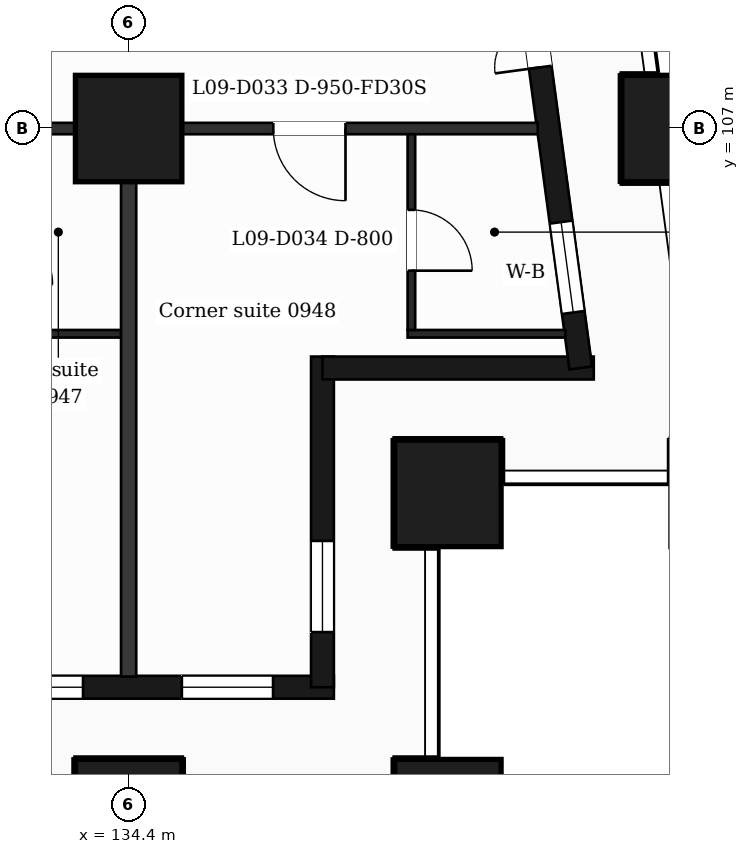
"""IFC4 building model, lengths in metres.
Left out: names, types, materials, properties, quantities, classifications, styles, units other than length and angle.
Written with IfcOpenShell. Run it as: python <this file> out.ifc"""

import sys

from ifc_helpers import new_model, si_unit, direction, frame, frame_2d, origin, origin_2d, place, context, subcontext, project, spatial, rectangle, extrude, element, fill, save


model = new_model("IFC4")
c1 = context("Model", 3, precision=1e-05, world=origin(), true_north=direction((0.0, 1.0)))
c2 = subcontext(c1, "Body", "Model", "MODEL_VIEW")
j1 = project(units=[si_unit("LENGTHUNIT", "METRE"), si_unit("PLANEANGLEUNIT", "RADIAN")], contexts=[c1])
p1 = place(None, origin())
s1 = spatial("IfcSite", under=j1, at=p1, CompositionType="ELEMENT")
p2 = place(p1, origin())
s2 = spatial("IfcBuilding", under=s1, at=p2, CompositionType="ELEMENT")
p3 = place(p2, frame((0.0, 0.0, 49.5)))
s3 = spatial("IfcBuildingStorey", under=s2, at=p3, CompositionType="ELEMENT", Elevation=49.5)
for number, where, z_axis, x_axis in (
    (1, (134.4, 98.0, 0.0), (0.0, 0.0, 1.0), (1.0, 0.0, 0.0)),
    (2, (138.6, 98.0, 0.0), (0.0, 0.0, 1.0), (1.0, 0.0, 0.0)),
    (3, (138.6, 102.2, 0.0), (0.0, 0.0, 1.0), (1.0, 0.0, 0.0)),
    (4, (134.4, 107.0, 0.0), (0.0, 0.0, 1.0), (1.0, 0.0, 0.0)),
    (5, (141.588, 107.0, 0.0), (0.0, 0.0, 1.0), (1.0, 0.0, 0.0)),
):
    element("IfcColumn", number, at=place(p3, frame(where, z_axis=z_axis, x_axis=x_axis)), inside=s3, PredefinedType="COLUMN", context=c2, shape_type="SweptSolid", body=[
        extrude(rectangle(XDim=1.4, YDim=1.4, at=origin_2d()), origin(), (0.0, 0.0, 1.0), 3.5),
    ])
p4 = place(p3, frame((89.85, 99.65, 0.0), z_axis=(0.0, 0.0, 1.0), x_axis=(1.0, 0.0, 0.0)))
e6 = element("IfcWall", 6, at=p4, inside=s3, PredefinedType="SOLIDWALL", context=c2, shape_type="SweptSolid", body=[
    extrude(rectangle(XDim=47.25, YDim=0.3, at=frame_2d((23.625, 0.0))), origin(), (0.0, 0.0, 1.0), 3.18),
])
p5 = place(p4, frame((0.725, 0.0, 0.9)))
e7 = element("IfcOpeningElement", 7, at=p5, cuts=e6, PredefinedType="OPENING", context=c2, shape_type="SweptSolid", body=[
    extrude(rectangle(XDim=1.2, YDim=2.1, at=frame_2d((0.6, 1.05))), frame((0.0, 0.16, 0.0), z_axis=(0.0, -1.0, 0.0), x_axis=(1.0, 0.0, 0.0)), (0.0, 0.0, 1.0), 0.32),
])
p6 = place(p4, frame((3.45, 0.0, 0.9)))
e8 = element("IfcOpeningElement", 8, at=p6, cuts=e6, PredefinedType="OPENING", context=c2, shape_type="SweptSolid", body=[
    extrude(rectangle(XDim=2.4, YDim=2.1, at=frame_2d((1.2, 1.05))), frame((0.0, 0.16, 0.0), z_axis=(0.0, -1.0, 0.0), x_axis=(1.0, 0.0, 0.0)), (0.0, 0.0, 1.0), 0.32),
])
p7 = place(p4, frame((7.65, 0.0, 0.9)))
e9 = element("IfcOpeningElement", 9, at=p7, cuts=e6, PredefinedType="OPENING", context=c2, shape_type="SweptSolid", body=[
    extrude(rectangle(XDim=2.4, YDim=2.1, at=frame_2d((1.2, 1.05))), frame((0.0, 0.16, 0.0), z_axis=(0.0, -1.0, 0.0), x_axis=(1.0, 0.0, 0.0)), (0.0, 0.0, 1.0), 0.32),
])
p8 = place(p4, frame((11.85, 0.0, 0.9)))
e10 = element("IfcOpeningElement", 10, at=p8, cuts=e6, PredefinedType="OPENING", context=c2, shape_type="SweptSolid", body=[
    extrude(rectangle(XDim=2.4, YDim=2.1, at=frame_2d((1.2, 1.05))), frame((0.0, 0.16, 0.0), z_axis=(0.0, -1.0, 0.0), x_axis=(1.0, 0.0, 0.0)), (0.0, 0.0, 1.0), 0.32),
])
p9 = place(p4, frame((16.05, 0.0, 0.9)))
e11 = element("IfcOpeningElement", 11, at=p9, cuts=e6, PredefinedType="OPENING", context=c2, shape_type="SweptSolid", body=[
    extrude(rectangle(XDim=2.4, YDim=2.1, at=frame_2d((1.2, 1.05))), frame((0.0, 0.16, 0.0), z_axis=(0.0, -1.0, 0.0), x_axis=(1.0, 0.0, 0.0)), (0.0, 0.0, 1.0), 0.32),
])
p10 = place(p4, frame((20.25, 0.0, 0.9)))
e12 = element("IfcOpeningElement", 12, at=p10, cuts=e6, PredefinedType="OPENING", context=c2, shape_type="SweptSolid", body=[
    extrude(rectangle(XDim=2.4, YDim=2.1, at=frame_2d((1.2, 1.05))), frame((0.0, 0.16, 0.0), z_axis=(0.0, -1.0, 0.0), x_axis=(1.0, 0.0, 0.0)), (0.0, 0.0, 1.0), 0.32),
])
p11 = place(p4, frame((25.05, 0.0, 0.9)))
e13 = element("IfcOpeningElement", 13, at=p11, cuts=e6, PredefinedType="OPENING", context=c2, shape_type="SweptSolid", body=[
    extrude(rectangle(XDim=1.2, YDim=2.1, at=frame_2d((0.6, 1.05))), frame((0.0, 0.16, 0.0), z_axis=(0.0, -1.0, 0.0), x_axis=(1.0, 0.0, 0.0)), (0.0, 0.0, 1.0), 0.32),
])
p12 = place(p4, frame((29.25, 0.0, 0.9)))
e14 = element("IfcOpeningElement", 14, at=p12, cuts=e6, PredefinedType="OPENING", context=c2, shape_type="SweptSolid", body=[
    extrude(rectangle(XDim=1.2, YDim=2.1, at=frame_2d((0.6, 1.05))), frame((0.0, 0.16, 0.0), z_axis=(0.0, -1.0, 0.0), x_axis=(1.0, 0.0, 0.0)), (0.0, 0.0, 1.0), 0.32),
])
p13 = place(p4, frame((32.55, 0.0, 0.0)))
e15 = element("IfcOpeningElement", 15, at=p13, cuts=e6, PredefinedType="OPENING", context=c2, shape_type="SweptSolid", body=[
    extrude(rectangle(XDim=1.2, YDim=2.4, at=frame_2d((0.6, 1.2))), frame((0.0, 0.16, 0.0), z_axis=(0.0, -1.0, 0.0), x_axis=(1.0, 0.0, 0.0)), (0.0, 0.0, 1.0), 0.32),
])
p14 = place(p4, frame((34.35, 0.0, 0.9)))
e16 = element("IfcOpeningElement", 16, at=p14, cuts=e6, PredefinedType="OPENING", context=c2, shape_type="SweptSolid", body=[
    extrude(rectangle(XDim=1.2, YDim=2.1, at=frame_2d((0.6, 1.05))), frame((0.0, 0.16, 0.0), z_axis=(0.0, -1.0, 0.0), x_axis=(1.0, 0.0, 0.0)), (0.0, 0.0, 1.0), 0.32),
])
p15 = place(p4, frame((37.05, 0.0, 0.9)))
e17 = element("IfcOpeningElement", 17, at=p15, cuts=e6, PredefinedType="OPENING", context=c2, shape_type="SweptSolid", body=[
    extrude(rectangle(XDim=2.4, YDim=2.1, at=frame_2d((1.2, 1.05))), frame((0.0, 0.16, 0.0), z_axis=(0.0, -1.0, 0.0), x_axis=(1.0, 0.0, 0.0)), (0.0, 0.0, 1.0), 0.32),
])
p16 = place(p4, frame((40.95, 0.0, 0.0)))
e18 = element("IfcOpeningElement", 18, at=p16, cuts=e6, PredefinedType="OPENING", context=c2, shape_type="SweptSolid", body=[
    extrude(rectangle(XDim=1.2, YDim=2.4, at=frame_2d((0.6, 1.2))), frame((0.0, 0.16, 0.0), z_axis=(0.0, -1.0, 0.0), x_axis=(1.0, 0.0, 0.0)), (0.0, 0.0, 1.0), 0.32),
])
p17 = place(p4, frame((42.75, 0.0, 0.9)))
e19 = element("IfcOpeningElement", 19, at=p17, cuts=e6, PredefinedType="OPENING", context=c2, shape_type="SweptSolid", body=[
    extrude(rectangle(XDim=1.2, YDim=2.1, at=frame_2d((0.6, 1.05))), frame((0.0, 0.16, 0.0), z_axis=(0.0, -1.0, 0.0), x_axis=(1.0, 0.0, 0.0)), (0.0, 0.0, 1.0), 0.32),
])
p18 = place(p4, frame((45.25, 0.0, 0.9)))
e20 = element("IfcOpeningElement", 20, at=p18, cuts=e6, PredefinedType="OPENING", context=c2, shape_type="SweptSolid", body=[
    extrude(rectangle(XDim=1.2, YDim=2.1, at=frame_2d((0.6, 1.05))), frame((0.0, 0.16, 0.0), z_axis=(0.0, -1.0, 0.0), x_axis=(1.0, 0.0, 0.0)), (0.0, 0.0, 1.0), 0.32),
])
p19 = place(p3, frame((136.95, 99.65, 0.0), z_axis=(0.0, 0.0, 1.0), x_axis=(0.0, 1.0, 0.0)))
e21 = element("IfcWall", 21, at=p19, inside=s3, PredefinedType="SOLIDWALL", context=c2, shape_type="SweptSolid", body=[
    extrude(rectangle(XDim=4.35, YDim=0.3, at=frame_2d((2.175, 0.0))), origin(), (0.0, 0.0, 1.0), 3.18),
])
p20 = place(p19, frame((0.725, 0.0, 0.9)))
e22 = element("IfcOpeningElement", 22, at=p20, cuts=e21, PredefinedType="OPENING", context=c2, shape_type="SweptSolid", body=[
    extrude(rectangle(XDim=1.2, YDim=2.1, at=frame_2d((0.6, 1.05))), frame((0.0, 0.16, 0.0), z_axis=(0.0, -1.0, 0.0), x_axis=(1.0, 0.0, 0.0)), (0.0, 0.0, 1.0), 0.32),
])
p21 = place(p3, frame((136.95, 103.85, 0.0), z_axis=(0.0, 0.0, 1.0), x_axis=(1.0, 0.0, 0.0)))
e23 = element("IfcWall", 23, at=p21, inside=s3, PredefinedType="SOLIDWALL", context=c2, shape_type="SweptSolid", body=[
    extrude(rectangle(XDim=3.569, YDim=0.3, at=frame_2d((1.785, 0.0))), origin(), (0.0, 0.0, 1.0), 3.18),
])
p22 = place(p3, frame((140.348, 103.85, 0.0), z_axis=(0.0, 0.0, 1.0), x_axis=(-0.133431549479, 0.991058031401, 0.0)))
e24 = element("IfcWall", 24, at=p22, inside=s3, PredefinedType="SOLIDWALL", context=c2, shape_type="SweptSolid", body=[
    extrude(rectangle(XDim=6.609, YDim=0.3, at=frame_2d((3.304, 0.0))), origin(), (0.0, 0.0, 1.0), 3.18),
])
p23 = place(p22, frame((0.737, 0.0, 0.9)))
e25 = element("IfcOpeningElement", 25, at=p23, cuts=e24, PredefinedType="OPENING", context=c2, shape_type="SweptSolid", body=[
    extrude(rectangle(XDim=1.2, YDim=2.1, at=frame_2d((0.6, 1.05))), frame((0.0, 0.16, 0.0), z_axis=(0.0, -1.0, 0.0), x_axis=(1.0, 0.0, 0.0)), (0.0, 0.0, 1.0), 0.32),
])
p24 = place(p22, frame((3.991, 0.0, 0.0)))
e26 = element("IfcOpeningElement", 26, at=p24, cuts=e24, PredefinedType="OPENING", context=c2, shape_type="SweptSolid", body=[
    extrude(rectangle(XDim=1.2, YDim=2.4, at=frame_2d((0.6, 1.2))), frame((0.0, 0.16, 0.0), z_axis=(0.0, -1.0, 0.0), x_axis=(1.0, 0.0, 0.0)), (0.0, 0.0, 1.0), 0.32),
])
p25 = place(p3, frame((132.55, 104.3, 0.0), z_axis=(0.0, 0.0, 1.0), x_axis=(1.0, 0.0, 0.0)))
e27 = element("IfcWall", 27, at=p25, inside=s3, PredefinedType="PARTITIONING", context=c2, shape_type="SweptSolid", body=[
    extrude(rectangle(XDim=1.85, YDim=0.1, at=frame_2d((0.925, 0.0))), origin(), (0.0, 0.0, 1.0), 3.18),
])
p26 = place(p3, frame((138.07, 104.3, 0.0), z_axis=(0.0, 0.0, 1.0), x_axis=(1.0, 0.0, 0.0)))
e28 = element("IfcWall", 28, at=p26, inside=s3, PredefinedType="PARTITIONING", context=c2, shape_type="SweptSolid", body=[
    extrude(rectangle(XDim=2.076, YDim=0.1, at=frame_2d((1.038, 0.0))), origin(), (0.0, 0.0, 1.0), 3.18),
])
p27 = place(p3, frame((87.018, 107.0, 0.0), z_axis=(0.0, 0.0, 1.0), x_axis=(1.0, 0.0, 0.0)))
e29 = element("IfcWall", 29, at=p27, inside=s3, PredefinedType="PARTITIONING", context=c2, shape_type="SweptSolid", body=[
    extrude(rectangle(XDim=52.765, YDim=0.15, at=frame_2d((26.382, 0.0))), origin(), (0.0, 0.0, 1.0), 3.18),
])
p28 = place(p27, frame((0.87, 0.0, 0.0)))
e30 = element("IfcOpeningElement", 30, at=p28, cuts=e29, PredefinedType="OPENING", context=c2, shape_type="SweptSolid", body=[
    extrude(rectangle(XDim=0.95, YDim=2.1, at=frame_2d((0.475, 1.05))), frame((0.0, 0.085, 0.0), z_axis=(0.0, -1.0, 0.0), x_axis=(1.0, 0.0, 0.0)), (0.0, 0.0, 1.0), 0.17),
])
p29 = place(p27, frame((6.752, 0.0, 0.0)))
e31 = element("IfcOpeningElement", 31, at=p29, cuts=e29, PredefinedType="OPENING", context=c2, shape_type="SweptSolid", body=[
    extrude(rectangle(XDim=0.95, YDim=2.1, at=frame_2d((0.475, 1.05))), frame((0.0, 0.085, 0.0), z_axis=(0.0, -1.0, 0.0), x_axis=(1.0, 0.0, 0.0)), (0.0, 0.0, 1.0), 0.17),
])
p30 = place(p27, frame((9.857, 0.0, 0.0)))
e32 = element("IfcOpeningElement", 32, at=p30, cuts=e29, PredefinedType="OPENING", context=c2, shape_type="SweptSolid", body=[
    extrude(rectangle(XDim=0.95, YDim=2.1, at=frame_2d((0.475, 1.05))), frame((0.0, 0.085, 0.0), z_axis=(0.0, -1.0, 0.0), x_axis=(1.0, 0.0, 0.0)), (0.0, 0.0, 1.0), 0.17),
])
p31 = place(p27, frame((14.682, 0.0, 0.0)))
e33 = element("IfcOpeningElement", 33, at=p31, cuts=e29, PredefinedType="OPENING", context=c2, shape_type="SweptSolid", body=[
    extrude(rectangle(XDim=0.95, YDim=2.1, at=frame_2d((0.475, 1.05))), frame((0.0, 0.085, 0.0), z_axis=(0.0, -1.0, 0.0), x_axis=(1.0, 0.0, 0.0)), (0.0, 0.0, 1.0), 0.17),
])
p32 = place(p27, frame((19.862, 0.0, 0.0)))
e34 = element("IfcOpeningElement", 34, at=p32, cuts=e29, PredefinedType="OPENING", context=c2, shape_type="SweptSolid", body=[
    extrude(rectangle(XDim=0.95, YDim=2.1, at=frame_2d((0.475, 1.05))), frame((0.0, 0.085, 0.0), z_axis=(0.0, -1.0, 0.0), x_axis=(1.0, 0.0, 0.0)), (0.0, 0.0, 1.0), 0.17),
])
p33 = place(p27, frame((25.157, 0.0, 0.0)))
e35 = element("IfcOpeningElement", 35, at=p33, cuts=e29, PredefinedType="OPENING", context=c2, shape_type="SweptSolid", body=[
    extrude(rectangle(XDim=0.95, YDim=2.1, at=frame_2d((0.475, 1.05))), frame((0.0, 0.085, 0.0), z_axis=(0.0, -1.0, 0.0), x_axis=(1.0, 0.0, 0.0)), (0.0, 0.0, 1.0), 0.17),
])
p34 = place(p27, frame((28.262, 0.0, 0.0)))
e36 = element("IfcOpeningElement", 36, at=p34, cuts=e29, PredefinedType="OPENING", context=c2, shape_type="SweptSolid", body=[
    extrude(rectangle(XDim=0.95, YDim=2.1, at=frame_2d((0.475, 1.05))), frame((0.0, 0.085, 0.0), z_axis=(0.0, -1.0, 0.0), x_axis=(1.0, 0.0, 0.0)), (0.0, 0.0, 1.0), 0.17),
])
p35 = place(p27, frame((32.207, 0.0, 0.0)))
e37 = element("IfcOpeningElement", 37, at=p35, cuts=e29, PredefinedType="OPENING", context=c2, shape_type="SweptSolid", body=[
    extrude(rectangle(XDim=0.95, YDim=2.1, at=frame_2d((0.475, 1.05))), frame((0.0, 0.085, 0.0), z_axis=(0.0, -1.0, 0.0), x_axis=(1.0, 0.0, 0.0)), (0.0, 0.0, 1.0), 0.17),
])
p36 = place(p27, frame((37.094, 0.0, 0.0)))
e38 = element("IfcOpeningElement", 38, at=p36, cuts=e29, PredefinedType="OPENING", context=c2, shape_type="SweptSolid", body=[
    extrude(rectangle(XDim=0.95, YDim=2.1, at=frame_2d((0.475, 1.05))), frame((0.0, 0.085, 0.0), z_axis=(0.0, -1.0, 0.0), x_axis=(1.0, 0.0, 0.0)), (0.0, 0.0, 1.0), 0.17),
])
p37 = place(p27, frame((43.045, 0.0, 0.0)))
e39 = element("IfcOpeningElement", 39, at=p37, cuts=e29, PredefinedType="OPENING", context=c2, shape_type="SweptSolid", body=[
    extrude(rectangle(XDim=0.95, YDim=2.1, at=frame_2d((0.475, 1.05))), frame((0.0, 0.085, 0.0), z_axis=(0.0, -1.0, 0.0), x_axis=(1.0, 0.0, 0.0)), (0.0, 0.0, 1.0), 0.17),
])
p38 = place(p27, frame((49.285, 0.0, 0.0)))
e40 = element("IfcOpeningElement", 40, at=p38, cuts=e29, PredefinedType="OPENING", context=c2, shape_type="SweptSolid", body=[
    extrude(rectangle(XDim=0.95, YDim=2.1, at=frame_2d((0.475, 1.05))), frame((0.0, 0.085, 0.0), z_axis=(0.0, -1.0, 0.0), x_axis=(1.0, 0.0, 0.0)), (0.0, 0.0, 1.0), 0.17),
])
p39 = place(p3, frame((134.4, 99.79, 0.0), z_axis=(0.0, 0.0, 1.0), x_axis=(0.0, 1.0, 0.0)))
e41 = element("IfcWall", 41, at=p39, inside=s3, PredefinedType="PARTITIONING", context=c2, shape_type="SweptSolid", body=[
    extrude(rectangle(XDim=7.135, YDim=0.2, at=frame_2d((3.567, 0.0))), origin(), (0.0, 0.0, 1.0), 3.18),
])
p40 = place(p3, frame((138.12, 104.35, 0.0), z_axis=(0.0, 0.0, 1.0), x_axis=(0.0, 1.0, 0.0)))
e42 = element("IfcWall", 42, at=p40, inside=s3, PredefinedType="PARTITIONING", context=c2, shape_type="SweptSolid", body=[
    extrude(rectangle(XDim=2.575, YDim=0.1, at=frame_2d((1.288, 0.0))), origin(), (0.0, 0.0, 1.0), 3.18),
])
p41 = place(p40, frame((0.78, 0.0, 0.0)))
e43 = element("IfcOpeningElement", 43, at=p41, cuts=e42, PredefinedType="OPENING", context=c2, shape_type="SweptSolid", body=[
    extrude(rectangle(XDim=0.8, YDim=2.1, at=frame_2d((0.4, 1.05))), frame((0.0, 0.06, 0.0), z_axis=(0.0, -1.0, 0.0), x_axis=(1.0, 0.0, 0.0)), (0.0, 0.0, 1.0), 0.12),
])
p42 = place(p17, origin())
e44 = element("IfcWindow", 44, at=p42, inside=s3, PartitioningType="SINGLE_PANEL", PredefinedType="WINDOW", context=c2, shape_type="SweptSolid", body=[
    extrude(rectangle(XDim=1.2, YDim=2.1, at=frame_2d((0.6, 1.05))), frame((0.0, 0.03, 0.0), z_axis=(0.0, -1.0, 0.0), x_axis=(1.0, 0.0, 0.0)), (0.0, 0.0, 1.0), 0.06),
])
fill(e19, e44)
p43 = place(p18, origin())
e45 = element("IfcWindow", 45, at=p43, inside=s3, PartitioningType="SINGLE_PANEL", PredefinedType="WINDOW", context=c2, shape_type="SweptSolid", body=[
    extrude(rectangle(XDim=1.2, YDim=2.1, at=frame_2d((0.6, 1.05))), frame((0.0, 0.03, 0.0), z_axis=(0.0, -1.0, 0.0), x_axis=(1.0, 0.0, 0.0)), (0.0, 0.0, 1.0), 0.06),
])
fill(e20, e45)
p44 = place(p20, origin())
e46 = element("IfcWindow", 46, at=p44, inside=s3, PartitioningType="SINGLE_PANEL", PredefinedType="WINDOW", context=c2, shape_type="SweptSolid", body=[
    extrude(rectangle(XDim=1.2, YDim=2.1, at=frame_2d((0.6, 1.05))), frame((0.0, 0.03, 0.0), z_axis=(0.0, -1.0, 0.0), x_axis=(1.0, 0.0, 0.0)), (0.0, 0.0, 1.0), 0.06),
])
fill(e22, e46)
p45 = place(p23, origin())
e47 = element("IfcWindow", 47, at=p45, inside=s3, PartitioningType="SINGLE_PANEL", PredefinedType="WINDOW", context=c2, shape_type="SweptSolid", body=[
    extrude(rectangle(XDim=1.2, YDim=2.1, at=frame_2d((0.6, 1.05))), frame((0.0, 0.03, 0.0), z_axis=(0.0, -1.0, 0.0), x_axis=(1.0, 0.0, 0.0)), (0.0, 0.0, 1.0), 0.06),
])
fill(e25, e47)
p46 = place(p24, origin())
e48 = element("IfcDoor", 48, at=p46, inside=s3, OperationType="DOUBLE_DOOR_SINGLE_SWING", PredefinedType="DOOR", context=c2, shape_type="SweptSolid", body=[
    extrude(rectangle(XDim=1.2, YDim=2.4, at=frame_2d((0.6, 1.2))), frame((0.0, 0.025, 0.0), z_axis=(0.0, -1.0, 0.0), x_axis=(1.0, 0.0, 0.0)), (0.0, 0.0, 1.0), 0.05),
])
fill(e26, e48)
p47 = place(p38, origin())
e49 = element("IfcDoor", 49, at=p47, inside=s3, OperationType="SINGLE_SWING_RIGHT", PredefinedType="DOOR", context=c2, shape_type="SweptSolid", body=[
    extrude(rectangle(XDim=0.95, YDim=2.1, at=frame_2d((0.475, 1.05))), frame((0.0, 0.025, 0.0), z_axis=(0.0, -1.0, 0.0), x_axis=(1.0, 0.0, 0.0)), (0.0, 0.0, 1.0), 0.05),
])
fill(e40, e49)
p48 = place(p41, origin())
e50 = element("IfcDoor", 50, at=p48, inside=s3, OperationType="SINGLE_SWING_LEFT", PredefinedType="DOOR", context=c2, shape_type="SweptSolid", body=[
    extrude(rectangle(XDim=0.8, YDim=2.1, at=frame_2d((0.4, 1.05))), frame((0.0, 0.025, 0.0), z_axis=(0.0, -1.0, 0.0), x_axis=(1.0, 0.0, 0.0)), (0.0, 0.0, 1.0), 0.05),
])
fill(e43, e50)
save(model, sys.argv[1])
